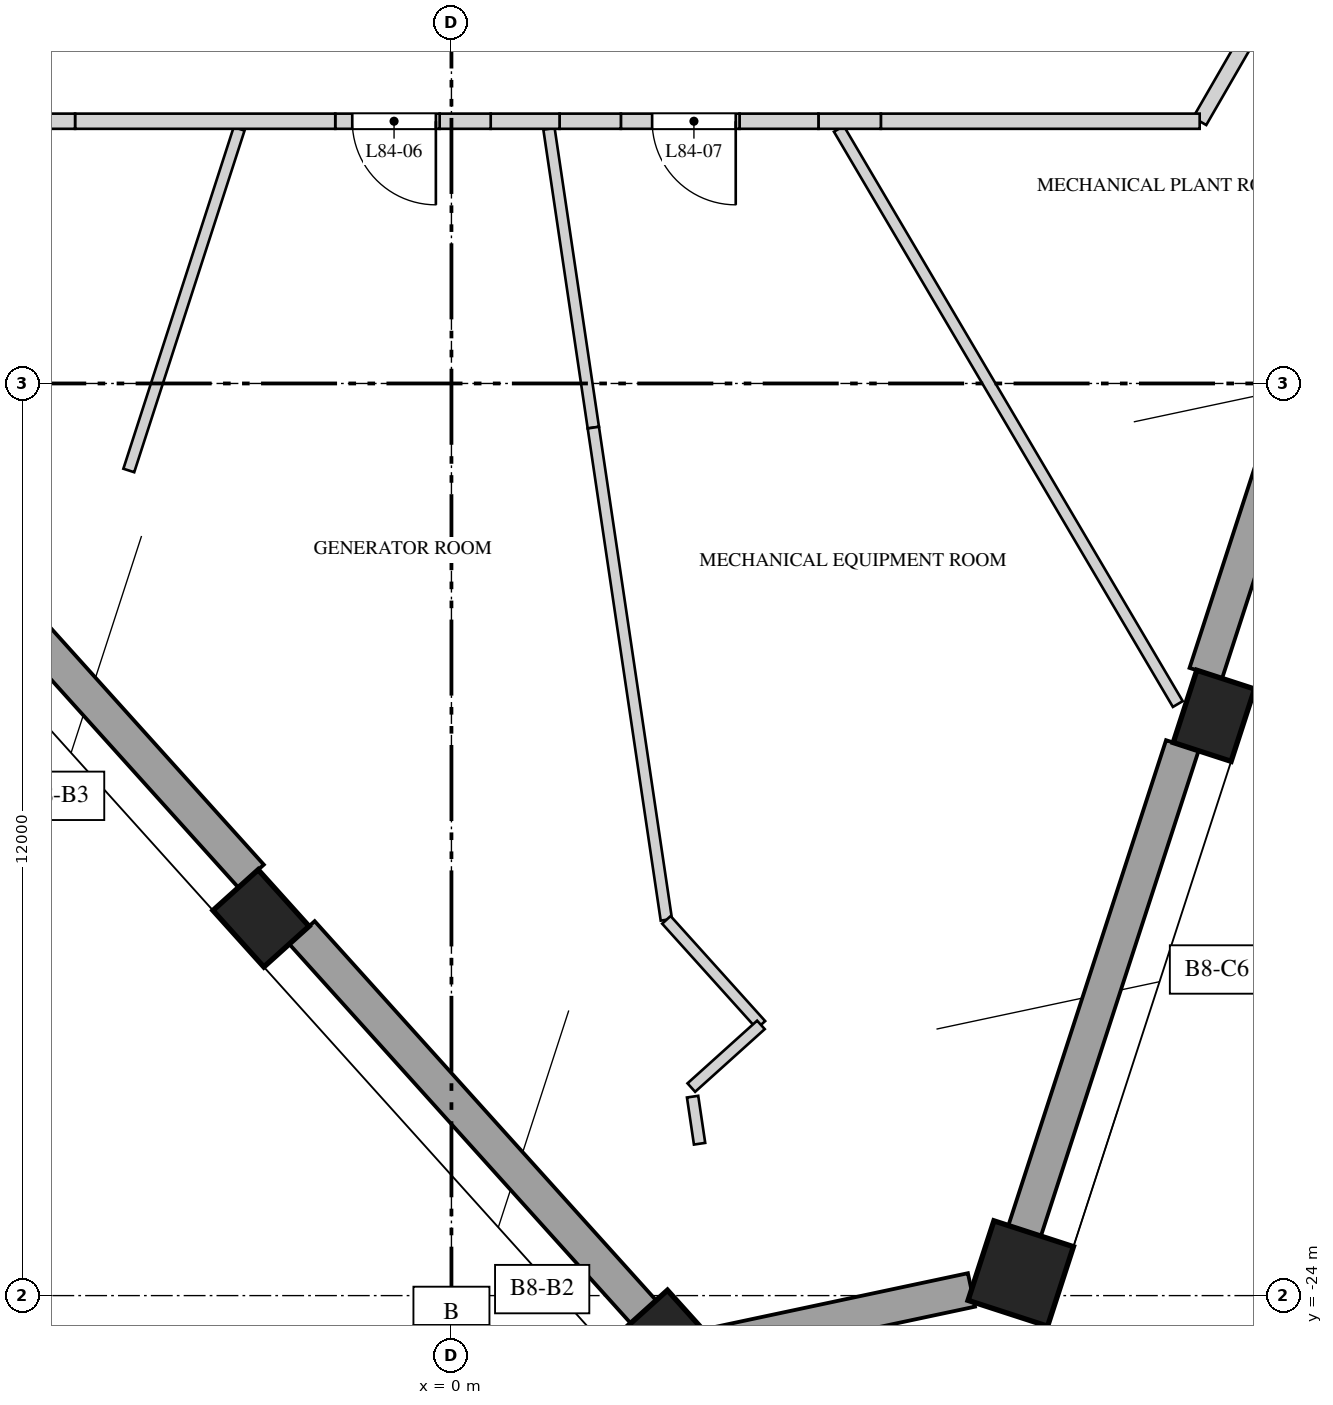
"""IFC4 building model, lengths in metres.
Left out: names, types, materials, properties, quantities, classifications, styles, units other than length and angle.
Written with IfcOpenShell. Run it as: python <this file> out.ifc"""

import sys

from ifc_helpers import new_model, si_unit, direction, frame, frame_2d, origin, origin_2d, place, context, subcontext, project, spatial, polyline, rectangle, outline, extrude, element, fill, save


model = new_model("IFC4")
c1 = context("Model", 3, precision=1e-05, world=origin(), true_north=direction((0.0, 1.0)))
c2 = subcontext(c1, "Body", "Model", "MODEL_VIEW")
j1 = project(units=[si_unit("LENGTHUNIT", "METRE"), si_unit("PLANEANGLEUNIT", "RADIAN")], contexts=[c1])
p1 = place(None, origin())
s1 = spatial("IfcSite", under=j1, at=p1, CompositionType="ELEMENT")
p2 = place(p1, origin())
s2 = spatial("IfcBuilding", under=s1, at=p2, CompositionType="ELEMENT")
p3 = place(p2, frame((0.0, 0.0, 365.9)))
s3 = spatial("IfcBuildingStorey", under=s2, at=p3, CompositionType="ELEMENT", Elevation=365.9)
p4 = place(p3, frame((-2.505, -19.037, 0.0), z_axis=(0.0, 0.0, 1.0), x_axis=(0.669130606359, -0.743144825477, 0.0)))
e1 = element("IfcColumn", 1, at=p4, inside=s3, PredefinedType="COLUMN", context=c2, shape_type="SweptSolid", body=[
    extrude(rectangle(XDim=1.0, YDim=0.8, at=origin_2d()), origin(), (0.0, 0.0, 1.0), 4.5),
])
for number, where, z_axis, x_axis in (
    (2, (2.801, -24.706, 0.0), (0.0, 0.0, 1.0), (0.669, -0.743, 0.0)),
    (3, (7.49, -23.709, 0.0), (0.0, 0.0, 1.0), (0.309, 0.951, 0.0)),
):
    element("IfcColumn", number, at=place(p3, frame(where, z_axis=z_axis, x_axis=x_axis)), inside=s3, PredefinedType="COLUMN", context=c2, shape_type="SweptSolid", body=[
        extrude(rectangle(XDim=1.1, YDim=1.1, at=origin_2d()), origin(), (0.0, 0.0, 1.0), 4.5),
    ])
p5 = place(p3, frame((10.032, -16.372, 0.0), z_axis=(0.0, 0.0, 1.0), x_axis=(0.309016994375, 0.951056516295, 0.0)))
e4 = element("IfcColumn", 4, at=p5, inside=s3, PredefinedType="COLUMN", context=c2, shape_type="SweptSolid", body=[
    extrude(rectangle(XDim=1.0, YDim=0.8, at=origin_2d()), origin(), (0.0, 0.0, 1.0), 4.5),
])
p6 = place(p3, frame((-7.53, -13.046, 0.0), z_axis=(0.0, 0.0, 1.0), x_axis=(0.669152823362, -0.743124820597, 0.0)))
e5 = element("IfcWall", 5, at=p6, inside=s3, PredefinedType="SOLIDWALL", context=c2, shape_type="SweptSolid", body=[
    extrude(rectangle(XDim=7.314, YDim=0.45, at=frame_2d((3.657, 0.0))), origin(), (0.0, 0.0, 1.0), 3.8),
])
p7 = place(p3, frame((-1.966, -19.224, 0.0), z_axis=(0.0, 0.0, 1.0), x_axis=(0.66911941145, -0.743154905266, 0.0)))
e6 = element("IfcWall", 6, at=p7, inside=s3, PredefinedType="SOLIDWALL", context=c2, shape_type="SweptSolid", body=[
    extrude(rectangle(XDim=6.714, YDim=0.45, at=frame_2d((3.357, 0.0))), origin(), (0.0, 0.0, 1.0), 3.8),
])
p8 = place(p3, frame((3.481, -24.64, 0.0), z_axis=(0.0, 0.0, 1.0), x_axis=(0.978139158523, 0.207951404333, 0.0)))
e7 = element("IfcWall", 7, at=p8, inside=s3, PredefinedType="SOLIDWALL", context=c2, shape_type="SweptSolid", body=[
    extrude(rectangle(XDim=3.435, YDim=0.45, at=frame_2d((1.718, 0.0))), origin(), (0.0, 0.0, 1.0), 3.8),
])
p9 = place(p3, frame((7.541, -23.148, 0.0), z_axis=(0.0, 0.0, 1.0), x_axis=(0.309018647645, 0.951055979114, 0.0)))
e8 = element("IfcWall", 8, at=p9, inside=s3, PredefinedType="SOLIDWALL", context=c2, shape_type="SweptSolid", body=[
    extrude(rectangle(XDim=6.714, YDim=0.45, at=frame_2d((3.357, 0.0))), origin(), (0.0, 0.0, 1.0), 3.8),
])
p10 = place(p3, frame((9.925, -15.812, 0.0), z_axis=(0.0, 0.0, 1.0), x_axis=(0.309008326872, 0.951059332494, 0.0)))
e9 = element("IfcWall", 9, at=p10, inside=s3, PredefinedType="SOLIDWALL", context=c2, shape_type="SweptSolid", body=[
    extrude(rectangle(XDim=7.314, YDim=0.45, at=frame_2d((3.657, 0.0))), origin(), (0.0, 0.0, 1.0), 3.8),
])
p11 = place(p3, frame((-2.793, -8.65, 0.0), z_axis=(0.0, 0.0, 1.0), x_axis=(-0.307297266893, -0.951613571656, 0.0)))
e10 = element("IfcWall", 10, at=p11, inside=s3, PredefinedType="PARTITIONING", context=c2, shape_type="SweptSolid", body=[
    extrude(rectangle(XDim=4.723, YDim=0.15, at=frame_2d((2.362, 0.0))), origin(), (0.0, 0.0, 1.0), 4.15),
])
p12 = place(p3, frame((1.283, -8.65, 0.0), z_axis=(0.0, 0.0, 1.0), x_axis=(0.146778002289, -0.98916945871, 0.0)))
e11 = element("IfcWall", 11, at=p12, inside=s3, PredefinedType="PARTITIONING", context=c2, shape_type="SweptSolid", body=[
    extrude(rectangle(XDim=3.974, YDim=0.15, at=frame_2d((1.987, 0.0))), origin(), (0.0, 0.0, 1.0), 3.05),
])
p13 = place(p3, frame((1.867, -12.581, 0.0), z_axis=(0.0, 0.0, 1.0), x_axis=(0.146760871061, -0.989172000577, 0.0)))
e12 = element("IfcWall", 12, at=p13, inside=s3, PredefinedType="PARTITIONING", context=c2, shape_type="SweptSolid", body=[
    extrude(rectangle(XDim=6.546, YDim=0.15, at=frame_2d((3.273, 0.0))), origin(), (0.0, 0.0, 1.0), 4.15),
])
p14 = place(p3, frame((2.828, -19.057, 0.0), z_axis=(0.0, 0.0, 1.0), x_axis=(0.66910257544, -0.743170063673, 0.0)))
e13 = element("IfcWall", 13, at=p14, inside=s3, PredefinedType="PARTITIONING", context=c2, shape_type="SweptSolid", body=[
    extrude(rectangle(XDim=1.859, YDim=0.15, at=frame_2d((0.93, 0.0))), origin(), (0.0, 0.0, 1.0), 4.15),
])
p15 = place(p3, frame((3.173, -21.383, 0.0), z_axis=(0.0, 0.0, 1.0), x_axis=(0.146986678694, -0.989138471745, 0.0)))
e14 = element("IfcWall", 14, at=p15, inside=s3, PredefinedType="PARTITIONING", context=c2, shape_type="SweptSolid", body=[
    extrude(rectangle(XDim=0.626, YDim=0.15, at=frame_2d((0.313, 0.0))), origin(), (0.0, 0.0, 1.0), 4.15),
])
p16 = place(p3, frame((4.072, -20.438, 0.0), z_axis=(0.0, 0.0, 1.0), x_axis=(-0.74317594648, -0.669096041367, 0.0)))
e15 = element("IfcWall", 15, at=p16, inside=s3, PredefinedType="PARTITIONING", context=c2, shape_type="SweptSolid", body=[
    extrude(rectangle(XDim=1.233, YDim=0.15, at=frame_2d((0.616, 0.0))), origin(), (0.0, 0.0, 1.0), 4.15),
])
p17 = place(p3, frame((5.097, -8.65, 0.0), z_axis=(0.0, 0.0, 1.0), x_axis=(0.507661360347, -0.861556697618, 0.0)))
e16 = element("IfcWall", 16, at=p17, inside=s3, PredefinedType="PARTITIONING", context=c2, shape_type="SweptSolid", body=[
    extrude(rectangle(XDim=8.783, YDim=0.15, at=frame_2d((4.392, 0.0))), origin(), (0.0, 0.0, 1.0), 3.45),
])
p18 = place(p3, frame((10.474, -7.458, 0.0), z_axis=(0.0, 0.0, 1.0), x_axis=(-0.499929168788, -0.866066294342, 0.0)))
e17 = element("IfcWall", 17, at=p18, inside=s3, PredefinedType="SOLIDWALL", context=c2, shape_type="SweptSolid", body=[
    extrude(rectangle(XDim=1.261, YDim=0.2, at=frame_2d((0.63, 0.0))), origin(), (0.0, 0.0, 1.0), 4.15),
])
p19 = place(p3, frame((9.844, -8.55, 0.0), z_axis=(0.0, 0.0, 1.0), x_axis=(-1.0, 0.0, 0.0)))
e18 = element("IfcWall", 18, at=p19, inside=s3, PredefinedType="SOLIDWALL", context=c2, shape_type="SweptSolid", body=[
    extrude(rectangle(XDim=4.194, YDim=0.2, at=frame_2d((2.097, 0.0))), origin(), (0.0, 0.0, 1.0), 4.15),
])
p20 = place(p3, frame((5.649, -8.55, 0.0), z_axis=(0.0, 0.0, 1.0), x_axis=(-1.0, 0.0, 0.0)))
e19 = element("IfcWall", 19, at=p20, inside=s3, PredefinedType="SOLIDWALL", context=c2, shape_type="SweptSolid", body=[
    extrude(rectangle(XDim=0.821, YDim=0.2, at=frame_2d((0.411, 0.0))), origin(), (0.0, 0.0, 1.0), 3.45),
])
p21 = place(p3, frame((4.828, -8.55, 0.0), z_axis=(0.0, 0.0, 1.0), x_axis=(-1.0, 0.0, 0.0)))
e20 = element("IfcWall", 20, at=p21, inside=s3, PredefinedType="SOLIDWALL", context=c2, shape_type="SweptSolid", body=[
    extrude(rectangle(XDim=1.038, YDim=0.2, at=frame_2d((0.519, 0.0))), origin(), (0.0, 0.0, 1.0), 4.15),
])
p22 = place(p3, frame((3.79, -8.55, 0.0), z_axis=(0.0, 0.0, 1.0), x_axis=(-1.0, 0.0, 0.0)))
e21 = element("IfcWall", 21, at=p22, inside=s3, PredefinedType="SOLIDWALL", context=c2, shape_type="SweptSolid", body=[
    extrude(outline(polyline([(0.0, 0.0), (1.561, 0.0), (1.561, 3.05), (0.617, 3.05), (0.617, 4.15), (0.0, 4.15), (0.0, 0.0)])), frame((0.0, 0.1, 0.0), z_axis=(0.0, -1.0, 0.0), x_axis=(1.0, 0.0, 0.0)), (0.0, 0.0, 1.0), 0.2),
])
p23 = place(p22, frame((0.05, 0.0, 0.0)))
e22 = element("IfcOpeningElement", 22, at=p23, cuts=e21, PredefinedType="OPENING", context=c2, shape_type="SweptSolid", body=[
    extrude(rectangle(XDim=1.1, YDim=2.4, at=frame_2d((0.55, 1.2))), frame((0.0, 0.11, 0.0), z_axis=(0.0, -1.0, 0.0), x_axis=(1.0, 0.0, 0.0)), (0.0, 0.0, 1.0), 0.22),
])
p24 = place(p3, frame((2.229, -8.55, 0.0), z_axis=(0.0, 0.0, 1.0), x_axis=(-1.0, 0.0, 0.0)))
e23 = element("IfcWall", 23, at=p24, inside=s3, PredefinedType="SOLIDWALL", context=c2, shape_type="SweptSolid", body=[
    extrude(rectangle(XDim=0.807, YDim=0.2, at=frame_2d((0.403, 0.0))), origin(), (0.0, 0.0, 1.0), 4.15),
])
p25 = place(p3, frame((1.422, -8.55, 0.0), z_axis=(0.0, 0.0, 1.0), x_axis=(-1.0, 0.0, 0.0)))
e24 = element("IfcWall", 24, at=p25, inside=s3, PredefinedType="SOLIDWALL", context=c2, shape_type="SweptSolid", body=[
    extrude(rectangle(XDim=0.906, YDim=0.2, at=frame_2d((0.453, 0.0))), origin(), (0.0, 0.0, 1.0), 3.05),
])
p26 = place(p3, frame((0.517, -8.55, 0.0), z_axis=(0.0, 0.0, 1.0), x_axis=(-1.0, 0.0, 0.0)))
e25 = element("IfcWall", 25, at=p26, inside=s3, PredefinedType="SOLIDWALL", context=c2, shape_type="SweptSolid", body=[
    extrude(rectangle(XDim=0.671, YDim=0.2, at=frame_2d((0.336, 0.0))), origin(), (0.0, 0.0, 1.0), 4.15),
])
p27 = place(p3, frame((-0.155, -8.55, 0.0), z_axis=(0.0, 0.0, 1.0), x_axis=(-1.0, 0.0, 0.0)))
e26 = element("IfcWall", 26, at=p27, inside=s3, PredefinedType="SOLIDWALL", context=c2, shape_type="SweptSolid", body=[
    extrude(outline(polyline([(0.0, 0.0), (1.374, 0.0), (1.374, 3.25), (0.567, 3.25), (0.567, 4.15), (0.0, 4.15), (0.0, 0.0)])), frame((0.0, 0.1, 0.0), z_axis=(0.0, -1.0, 0.0), x_axis=(1.0, 0.0, 0.0)), (0.0, 0.0, 1.0), 0.2),
])
p28 = place(p27, frame((0.05, 0.0, 0.0)))
e27 = element("IfcOpeningElement", 27, at=p28, cuts=e26, PredefinedType="OPENING", context=c2, shape_type="SweptSolid", body=[
    extrude(rectangle(XDim=1.1, YDim=2.4, at=frame_2d((0.55, 1.2))), frame((0.0, 0.11, 0.0), z_axis=(0.0, -1.0, 0.0), x_axis=(1.0, 0.0, 0.0)), (0.0, 0.0, 1.0), 0.22),
])
p29 = place(p3, frame((-1.529, -8.55, 0.0), z_axis=(0.0, 0.0, 1.0), x_axis=(-1.0, 0.0, 0.0)))
e28 = element("IfcWall", 28, at=p29, inside=s3, PredefinedType="SOLIDWALL", context=c2, shape_type="SweptSolid", body=[
    extrude(rectangle(XDim=3.423, YDim=0.2, at=frame_2d((1.711, 0.0))), origin(), (0.0, 0.0, 1.0), 4.15),
])
p30 = place(p3, frame((-6.838, -8.55, 0.0), z_axis=(0.0, 0.0, 1.0), x_axis=(1.0, 0.0, 0.0)))
e29 = element("IfcWall", 29, at=p30, inside=s3, PredefinedType="SOLIDWALL", context=c2, shape_type="SweptSolid", body=[
    extrude(outline(polyline([(0.0, 0.0), (1.886, 0.0), (1.886, 3.45), (1.06, 3.45), (1.06, 4.15), (0.0, 4.15), (0.0, 0.0)])), frame((0.0, 0.1, 0.0), z_axis=(0.0, -1.0, 0.0), x_axis=(1.0, 0.0, 0.0)), (0.0, 0.0, 1.0), 0.2),
])
p31 = place(p30, frame((0.05, 0.0, 0.0)))
e30 = element("IfcOpeningElement", 30, at=p31, cuts=e29, PredefinedType="OPENING", context=c2, shape_type="SweptSolid", body=[
    extrude(rectangle(XDim=1.1, YDim=2.4, at=frame_2d((0.55, 1.2))), frame((0.0, 0.11, 0.0), z_axis=(0.0, -1.0, 0.0), x_axis=(1.0, 0.0, 0.0)), (0.0, 0.0, 1.0), 0.22),
])
p32 = place(p28, origin())
e31 = element("IfcDoor", 31, at=p32, inside=s3, OperationType="SINGLE_SWING_RIGHT", PredefinedType="DOOR", context=c2, shape_type="SweptSolid", body=[
    extrude(rectangle(XDim=1.1, YDim=2.4, at=frame_2d((0.55, 1.2))), frame((0.0, 0.025, 0.0), z_axis=(0.0, -1.0, 0.0), x_axis=(1.0, 0.0, 0.0)), (0.0, 0.0, 1.0), 0.05),
])
fill(e27, e31)
p33 = place(p23, origin())
e32 = element("IfcDoor", 32, at=p33, inside=s3, OperationType="SINGLE_SWING_LEFT", PredefinedType="DOOR", context=c2, shape_type="SweptSolid", body=[
    extrude(rectangle(XDim=1.1, YDim=2.4, at=frame_2d((0.55, 1.2))), frame((0.0, 0.025, 0.0), z_axis=(0.0, -1.0, 0.0), x_axis=(1.0, 0.0, 0.0)), (0.0, 0.0, 1.0), 0.05),
])
fill(e22, e32)
save(model, sys.argv[1])
